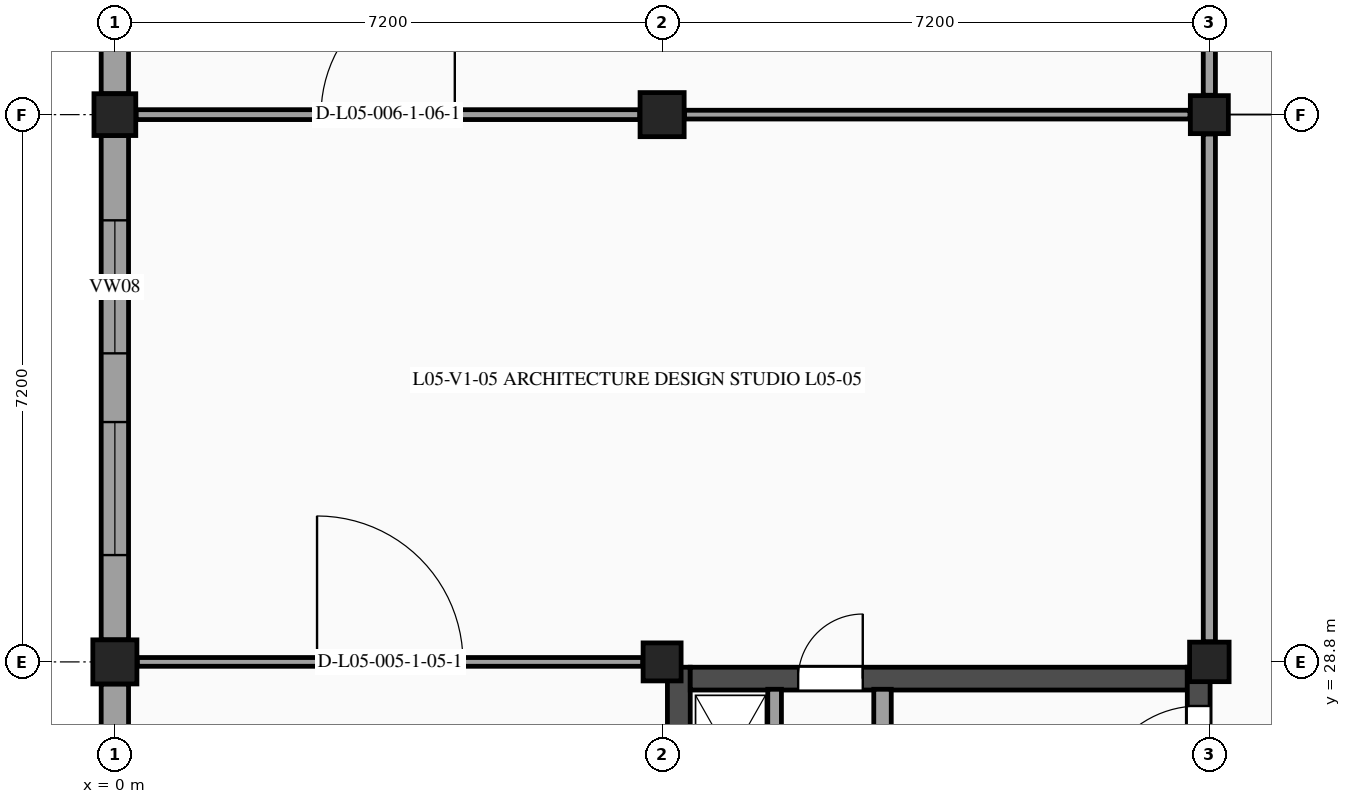
"""IFC4 building model, lengths in metres.
Left out: names, types, materials, properties, quantities, classifications, styles, units other than length and angle.
Written with IfcOpenShell. Run it as: python <this file> out.ifc"""

import sys

from ifc_helpers import new_model, si_unit, direction, frame, frame_2d, origin, origin_2d, place, context, subcontext, project, spatial, rectangle, extrude, element, fill, save


model = new_model("IFC4")
c1 = context("Model", 3, precision=1e-05, world=origin(), true_north=direction((0.0, 1.0)))
c2 = subcontext(c1, "Body", "Model", "MODEL_VIEW")
j1 = project(units=[si_unit("LENGTHUNIT", "METRE"), si_unit("PLANEANGLEUNIT", "RADIAN")], contexts=[c1])
p1 = place(None, origin())
s1 = spatial("IfcSite", under=j1, at=p1, CompositionType="ELEMENT")
p2 = place(p1, origin())
s2 = spatial("IfcBuilding", under=s1, at=p2, CompositionType="ELEMENT")
p3 = place(p2, frame((0.0, 0.0, 22.8)))
s3 = spatial("IfcBuildingStorey", under=s2, at=p3, CompositionType="ELEMENT", Elevation=22.8)
p4 = place(p3, frame((0.0, 28.8, 0.0), z_axis=(0.0, 0.0, 1.0), x_axis=(1.0, 0.0, 0.0)))
e1 = element("IfcColumn", 1, at=p4, inside=s3, PredefinedType="COLUMN", context=c2, shape_type="SweptSolid", body=[
    extrude(rectangle(XDim=0.58, YDim=0.58, at=origin_2d()), origin(), (0.0, 0.0, 1.0), 3.9),
])
p5 = place(p3, frame((0.0, 36.0, 0.0), z_axis=(0.0, 0.0, 1.0), x_axis=(1.0, 0.0, 0.0)))
e2 = element("IfcColumn", 2, at=p5, inside=s3, PredefinedType="COLUMN", context=c2, shape_type="SweptSolid", body=[
    extrude(rectangle(XDim=0.55, YDim=0.55, at=origin_2d()), origin(), (0.0, 0.0, 1.0), 3.9),
])
p6 = place(p3, frame((7.2, 28.8, 0.0), z_axis=(0.0, 0.0, 1.0), x_axis=(1.0, 0.0, 0.0)))
e3 = element("IfcColumn", 3, at=p6, inside=s3, PredefinedType="COLUMN", context=c2, shape_type="SweptSolid", body=[
    extrude(rectangle(XDim=0.5, YDim=0.5, at=origin_2d()), origin(), (0.0, 0.0, 1.0), 3.9),
])
p7 = place(p3, frame((7.2, 36.0, 0.0), z_axis=(0.0, 0.0, 1.0), x_axis=(1.0, 0.0, 0.0)))
e4 = element("IfcColumn", 4, at=p7, inside=s3, PredefinedType="COLUMN", context=c2, shape_type="SweptSolid", body=[
    extrude(rectangle(XDim=0.58, YDim=0.58, at=origin_2d()), origin(), (0.0, 0.0, 1.0), 3.9),
])
p8 = place(p3, frame((14.4, 28.8, 0.0), z_axis=(0.0, 0.0, 1.0), x_axis=(1.0, 0.0, 0.0)))
e5 = element("IfcColumn", 5, at=p8, inside=s3, PredefinedType="COLUMN", context=c2, shape_type="SweptSolid", body=[
    extrude(rectangle(XDim=0.52, YDim=0.52, at=origin_2d()), origin(), (0.0, 0.0, 1.0), 3.9),
])
p9 = place(p3, frame((14.4, 36.0, 0.0), z_axis=(0.0, 0.0, 1.0), x_axis=(1.0, 0.0, 0.0)))
e6 = element("IfcColumn", 6, at=p9, inside=s3, PredefinedType="COLUMN", context=c2, shape_type="SweptSolid", body=[
    extrude(rectangle(XDim=0.5, YDim=0.5, at=origin_2d()), origin(), (0.0, 0.0, 1.0), 3.9),
])
p10 = place(p3, frame((0.0, 21.85, 0.0), z_axis=(0.0, 0.0, 1.0), x_axis=(0.0, 1.0, 0.0)))
e7 = element("IfcWall", 7, at=p10, inside=s3, PredefinedType="STANDARD", context=c2, shape_type="SweptSolid", body=[
    extrude(rectangle(XDim=6.66, YDim=0.36, at=frame_2d((3.33, 0.0))), origin(), (0.0, 0.0, 1.0), 2.865),
])
p11 = place(p10, frame((1.023, 0.0, 1.15)))
e8 = element("IfcOpeningElement", 8, at=p11, cuts=e7, PredefinedType="OPENING", context=c2, shape_type="SweptSolid", body=[
    extrude(rectangle(XDim=1.95, YDim=1.4, at=frame_2d((0.975, 0.7))), frame((0.0, 0.19, 0.0), z_axis=(0.0, -1.0, 0.0), x_axis=(1.0, 0.0, 0.0)), (0.0, 0.0, 1.0), 0.38),
])
p12 = place(p10, frame((3.687, 0.0, 1.15)))
e9 = element("IfcOpeningElement", 9, at=p12, cuts=e7, PredefinedType="OPENING", context=c2, shape_type="SweptSolid", body=[
    extrude(rectangle(XDim=1.95, YDim=1.4, at=frame_2d((0.975, 0.7))), frame((0.0, 0.19, 0.0), z_axis=(0.0, -1.0, 0.0), x_axis=(1.0, 0.0, 0.0)), (0.0, 0.0, 1.0), 0.38),
])
p13 = place(p3, frame((0.0, 29.09, 0.0), z_axis=(0.0, 0.0, 1.0), x_axis=(0.0, 1.0, 0.0)))
e10 = element("IfcWall", 10, at=p13, inside=s3, PredefinedType="STANDARD", context=c2, shape_type="SweptSolid", body=[
    extrude(rectangle(XDim=6.635, YDim=0.36, at=frame_2d((3.317, 0.0))), origin(), (0.0, 0.0, 1.0), 2.865),
])
p14 = place(p13, frame((1.115, 0.0, 1.15)))
e11 = element("IfcOpeningElement", 11, at=p14, cuts=e10, PredefinedType="OPENING", context=c2, shape_type="SweptSolid", body=[
    extrude(rectangle(XDim=1.75, YDim=1.4, at=frame_2d((0.875, 0.7))), frame((0.0, 0.19, 0.0), z_axis=(0.0, -1.0, 0.0), x_axis=(1.0, 0.0, 0.0)), (0.0, 0.0, 1.0), 0.38),
])
p15 = place(p13, frame((3.77, 0.0, 1.15)))
e12 = element("IfcOpeningElement", 12, at=p15, cuts=e10, PredefinedType="OPENING", context=c2, shape_type="SweptSolid", body=[
    extrude(rectangle(XDim=1.75, YDim=1.4, at=frame_2d((0.875, 0.7))), frame((0.0, 0.19, 0.0), z_axis=(0.0, -1.0, 0.0), x_axis=(1.0, 0.0, 0.0)), (0.0, 0.0, 1.0), 0.38),
])
p16 = place(p3, frame((0.0, 36.275, 0.0), z_axis=(0.0, 0.0, 1.0), x_axis=(0.0, 1.0, 0.0)))
e13 = element("IfcWall", 13, at=p16, inside=s3, PredefinedType="STANDARD", context=c2, shape_type="SweptSolid", body=[
    extrude(rectangle(XDim=6.665, YDim=0.36, at=frame_2d((3.333, 0.0))), origin(), (0.0, 0.0, 1.0), 2.865),
])
p17 = place(p16, frame((1.225, 0.0, 1.15)))
e14 = element("IfcOpeningElement", 14, at=p17, cuts=e13, PredefinedType="OPENING", context=c2, shape_type="SweptSolid", body=[
    extrude(rectangle(XDim=1.55, YDim=1.35, at=frame_2d((0.775, 0.675))), frame((0.0, 0.19, 0.0), z_axis=(0.0, -1.0, 0.0), x_axis=(1.0, 0.0, 0.0)), (0.0, 0.0, 1.0), 0.38),
])
p18 = place(p16, frame((3.89, 0.0, 1.15)))
e15 = element("IfcOpeningElement", 15, at=p18, cuts=e13, PredefinedType="OPENING", context=c2, shape_type="SweptSolid", body=[
    extrude(rectangle(XDim=1.55, YDim=1.35, at=frame_2d((0.775, 0.675))), frame((0.0, 0.19, 0.0), z_axis=(0.0, -1.0, 0.0), x_axis=(1.0, 0.0, 0.0)), (0.0, 0.0, 1.0), 0.38),
])
p19 = place(p3, frame((7.42, 28.73, 0.0), z_axis=(0.0, 0.0, 1.0), x_axis=(0.0, -1.0, 0.0)))
e16 = element("IfcWall", 16, at=p19, inside=s3, PredefinedType="SHEAR", context=c2, shape_type="SweptSolid", body=[
    extrude(rectangle(XDim=7.06, YDim=0.3, at=frame_2d((3.53, 0.0))), origin(), (0.0, 0.0, 1.0), 3.67),
])
p20 = place(p3, frame((7.57, 28.58, 0.0), z_axis=(0.0, 0.0, 1.0), x_axis=(1.0, 0.0, 0.0)))
e17 = element("IfcWall", 17, at=p20, inside=s3, PredefinedType="SHEAR", context=c2, shape_type="SweptSolid", body=[
    extrude(rectangle(XDim=6.54, YDim=0.3, at=frame_2d((3.27, 0.0))), origin(), (0.0, 0.0, 1.0), 3.67),
])
p21 = place(p20, frame((1.42, 0.0, 0.0)))
e18 = element("IfcOpeningElement", 18, at=p21, cuts=e17, PredefinedType="OPENING", context=c2, shape_type="SweptSolid", body=[
    extrude(rectangle(XDim=0.85, YDim=2.1, at=frame_2d((0.425, 1.05))), frame((0.0, 0.16, 0.0), z_axis=(0.0, -1.0, 0.0), x_axis=(1.0, 0.0, 0.0)), (0.0, 0.0, 1.0), 0.32),
])
p22 = place(p3, frame((10.1, 26.7, 0.0), z_axis=(0.0, 0.0, 1.0), x_axis=(0.0, 1.0, 0.0)))
e19 = element("IfcWall", 19, at=p22, inside=s3, PredefinedType="PARTITIONING", context=c2, shape_type="SweptSolid", body=[
    extrude(rectangle(XDim=1.74, YDim=0.23, at=frame_2d((0.87, 0.0))), origin(), (0.0, 0.0, 1.0), 3.67),
])
p23 = place(p3, frame((8.68, 26.68, 0.0), z_axis=(0.0, 0.0, 1.0), x_axis=(0.0, 1.0, 0.0)))
e20 = element("IfcWall", 20, at=p23, inside=s3, PredefinedType="PARTITIONING", context=c2, shape_type="SweptSolid", body=[
    extrude(rectangle(XDim=1.76, YDim=0.18, at=frame_2d((0.88, 0.0))), origin(), (0.0, 0.0, 1.0), 3.67),
])
p24 = place(p3, frame((14.26, 21.67, 0.0), z_axis=(0.0, 0.0, 1.0), x_axis=(0.0, 1.0, 0.0)))
e21 = element("IfcWall", 21, at=p24, inside=s3, PredefinedType="SHEAR", context=c2, shape_type="SweptSolid", body=[
    extrude(rectangle(XDim=7.06, YDim=0.3, at=frame_2d((3.53, 0.0))), origin(), (0.0, 0.0, 1.0), 3.67),
])
p25 = place(p24, frame((5.2, 0.0, 0.0)))
e22 = element("IfcOpeningElement", 22, at=p25, cuts=e21, PredefinedType="OPENING", context=c2, shape_type="SweptSolid", body=[
    extrude(rectangle(XDim=1.35, YDim=2.15, at=frame_2d((0.675, 1.075))), frame((0.0, 0.16, 0.0), z_axis=(0.0, -1.0, 0.0), x_axis=(1.0, 0.0, 0.0)), (0.0, 0.0, 1.0), 0.32),
])
p26 = place(p3, frame((0.295, 28.8, 0.0), z_axis=(0.0, 0.0, 1.0), x_axis=(1.0, 0.0, 0.0)))
e23 = element("IfcWall", 23, at=p26, inside=s3, PredefinedType="PARTITIONING", context=c2, shape_type="SweptSolid", body=[
    extrude(rectangle(XDim=6.65, YDim=0.115, at=frame_2d((3.325, 0.0))), origin(), (0.0, 0.0, 1.0), 2.97),
])
p27 = place(p26, frame((2.365, 0.0, 0.0)))
e24 = element("IfcOpeningElement", 24, at=p27, cuts=e23, PredefinedType="OPENING", context=c2, shape_type="SweptSolid", body=[
    extrude(rectangle(XDim=1.92, YDim=2.35, at=frame_2d((0.96, 1.175))), frame((0.0, 0.067, 0.0), z_axis=(0.0, -1.0, 0.0), x_axis=(1.0, 0.0, 0.0)), (0.0, 0.0, 1.0), 0.135),
])
p28 = place(p3, frame((0.28, 36.0, 0.0), z_axis=(0.0, 0.0, 1.0), x_axis=(1.0, 0.0, 0.0)))
e25 = element("IfcWall", 25, at=p28, inside=s3, PredefinedType="PARTITIONING", context=c2, shape_type="SweptSolid", body=[
    extrude(rectangle(XDim=6.625, YDim=0.13, at=frame_2d((3.312, 0.0))), origin(), (0.0, 0.0, 1.0), 2.97),
])
p29 = place(p28, frame((2.433, 0.0, 0.0)))
e26 = element("IfcOpeningElement", 26, at=p29, cuts=e25, PredefinedType="OPENING", context=c2, shape_type="SweptSolid", body=[
    extrude(rectangle(XDim=1.76, YDim=2.3, at=frame_2d((0.88, 1.15))), frame((0.0, 0.075, 0.0), z_axis=(0.0, -1.0, 0.0), x_axis=(1.0, 0.0, 0.0)), (0.0, 0.0, 1.0), 0.15),
])
p30 = place(p3, frame((14.4, 29.065, 0.0), z_axis=(0.0, 0.0, 1.0), x_axis=(0.0, 1.0, 0.0)))
e27 = element("IfcWall", 27, at=p30, inside=s3, PredefinedType="PARTITIONING", context=c2, shape_type="SweptSolid", body=[
    extrude(rectangle(XDim=6.68, YDim=0.16, at=frame_2d((3.34, 0.0))), origin(), (0.0, 0.0, 1.0), 2.985),
])
p31 = place(p3, frame((7.495, 36.0, 0.0), z_axis=(0.0, 0.0, 1.0), x_axis=(1.0, 0.0, 0.0)))
e28 = element("IfcWall", 28, at=p31, inside=s3, PredefinedType="PARTITIONING", context=c2, shape_type="SweptSolid", body=[
    extrude(rectangle(XDim=6.65, YDim=0.115, at=frame_2d((3.325, 0.0))), origin(), (0.0, 0.0, 1.0), 3.01),
])
p32 = place(p3, frame((14.4, 36.255, 0.0), z_axis=(0.0, 0.0, 1.0), x_axis=(0.0, 1.0, 0.0)))
e29 = element("IfcWall", 29, at=p32, inside=s3, PredefinedType="PARTITIONING", context=c2, shape_type="SweptSolid", body=[
    extrude(rectangle(XDim=6.65, YDim=0.16, at=frame_2d((3.325, 0.0))), origin(), (0.0, 0.0, 1.0), 2.98),
])
p33 = place(p14, origin())
e30 = element("IfcWindow", 30, at=p33, inside=s3, PartitioningType="SINGLE_PANEL", PredefinedType="WINDOW", context=c2, shape_type="SweptSolid", body=[
    extrude(rectangle(XDim=1.75, YDim=1.4, at=frame_2d((0.875, 0.7))), frame((0.0, -0.08, 0.0), z_axis=(0.0, -1.0, 0.0), x_axis=(1.0, 0.0, 0.0)), (0.0, 0.0, 1.0), 0.06),
])
fill(e11, e30)
p34 = place(p15, origin())
e31 = element("IfcWindow", 31, at=p34, inside=s3, PartitioningType="SINGLE_PANEL", PredefinedType="WINDOW", context=c2, shape_type="SweptSolid", body=[
    extrude(rectangle(XDim=1.75, YDim=1.4, at=frame_2d((0.875, 0.7))), frame((0.0, -0.08, 0.0), z_axis=(0.0, -1.0, 0.0), x_axis=(1.0, 0.0, 0.0)), (0.0, 0.0, 1.0), 0.06),
])
fill(e12, e31)
p35 = place(p21, origin())
e32 = element("IfcDoor", 32, at=p35, inside=s3, OperationType="SINGLE_SWING_RIGHT", PredefinedType="DOOR", context=c2, shape_type="SweptSolid", body=[
    extrude(rectangle(XDim=0.85, YDim=2.1, at=frame_2d((0.425, 1.05))), frame((0.0, 0.025, 0.0), z_axis=(0.0, -1.0, 0.0), x_axis=(1.0, 0.0, 0.0)), (0.0, 0.0, 1.0), 0.05),
])
fill(e18, e32)
p36 = place(p25, origin())
e33 = element("IfcDoor", 33, at=p36, inside=s3, OperationType="SINGLE_SWING_LEFT", PredefinedType="DOOR", context=c2, shape_type="SweptSolid", body=[
    extrude(rectangle(XDim=1.35, YDim=2.15, at=frame_2d((0.675, 1.075))), frame((0.0, 0.025, 0.0), z_axis=(0.0, -1.0, 0.0), x_axis=(1.0, 0.0, 0.0)), (0.0, 0.0, 1.0), 0.05),
])
fill(e22, e33)
p37 = place(p27, origin())
e34 = element("IfcDoor", 34, at=p37, inside=s3, OperationType="SINGLE_SWING_LEFT", PredefinedType="DOOR", context=c2, shape_type="SweptSolid", body=[
    extrude(rectangle(XDim=1.92, YDim=2.35, at=frame_2d((0.96, 1.175))), frame((0.0, 0.025, 0.0), z_axis=(0.0, -1.0, 0.0), x_axis=(1.0, 0.0, 0.0)), (0.0, 0.0, 1.0), 0.05),
])
fill(e24, e34)
p38 = place(p29, origin())
e35 = element("IfcDoor", 35, at=p38, inside=s3, OperationType="SINGLE_SWING_RIGHT", PredefinedType="DOOR", context=c2, shape_type="SweptSolid", body=[
    extrude(rectangle(XDim=1.76, YDim=2.3, at=frame_2d((0.88, 1.15))), frame((0.0, 0.025, 0.0), z_axis=(0.0, -1.0, 0.0), x_axis=(1.0, 0.0, 0.0)), (0.0, 0.0, 1.0), 0.05),
])
fill(e26, e35)
save(model, sys.argv[1])
